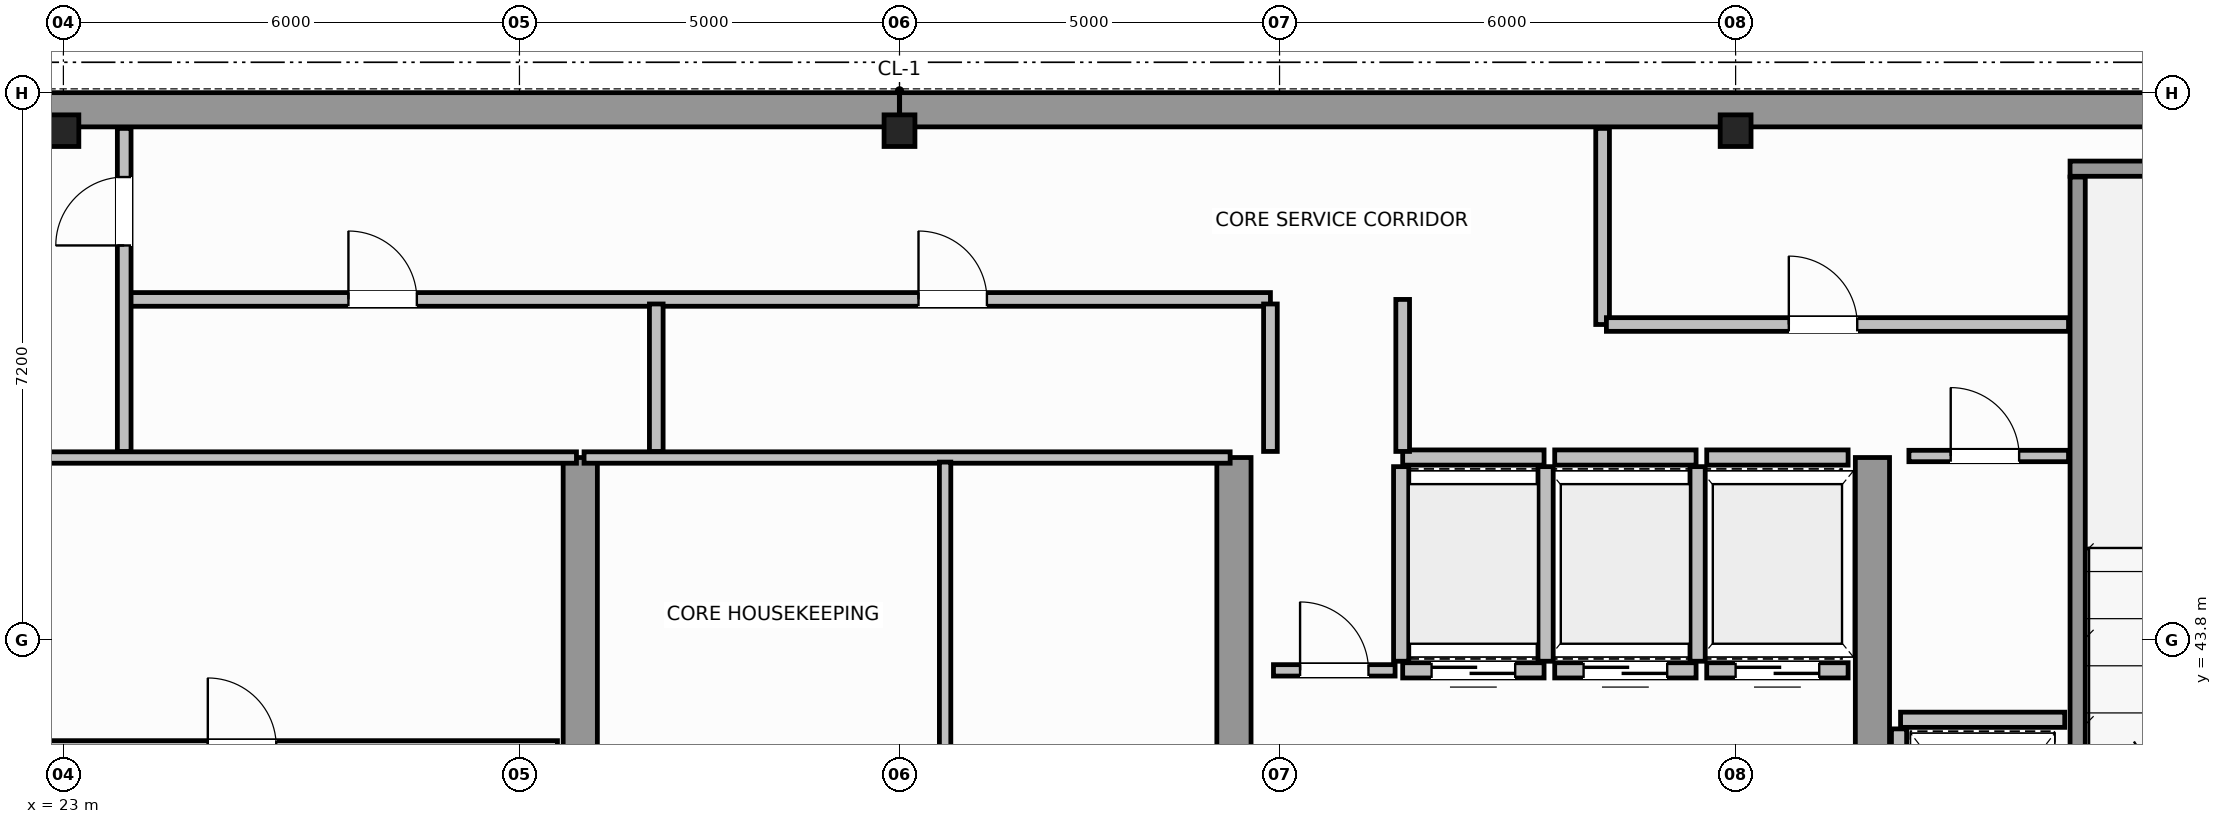
"""IFC4 building model, lengths in metres.
Left out: names, types, materials, properties, quantities, classifications, styles, units other than length and angle.
Written with IfcOpenShell. Run it as: python <this file> out.ifc"""

import sys

from ifc_helpers import new_model, si_unit, direction, frame, frame_2d, origin, origin_2d, place, context, subcontext, project, spatial, rectangle, i_section, extrude, source, transform, mapped, element, fill, save


model = new_model("IFC4")
c1 = context("Model", 3, precision=1e-05, world=origin(), true_north=direction((0.0, 1.0)))
c2 = subcontext(c1, "Body", "Model", "MODEL_VIEW")
j1 = project(units=[si_unit("LENGTHUNIT", "METRE"), si_unit("PLANEANGLEUNIT", "RADIAN")], contexts=[c1])
p1 = place(None, origin())
s1 = spatial("IfcSite", under=j1, at=p1, CompositionType="ELEMENT")
p2 = place(p1, origin())
s2 = spatial("IfcBuilding", under=s1, at=p2, CompositionType="ELEMENT")
p3 = place(p2, frame((0.0, 0.0, 291.6)))
s3 = spatial("IfcBuildingStorey", under=s2, at=p3, CompositionType="ELEMENT", Elevation=291.6)
m1 = source(origin(), c2, "Body", "SweptSolid", [
    extrude(i_section(OverallWidth=0.406, OverallDepth=0.416, WebThickness=0.03, FlangeThickness=0.042, FilletRadius=0.015, at=origin_2d()), origin(), (0.0, 0.0, 1.0), 3.8),
])
for number, where, z_axis, x_axis in (
    (1, (23.0, 50.5, 0.0), (0.0, 0.0, 1.0), (1.0, 0.0, 0.0)),
    (2, (34.0, 50.5, 0.0), (0.0, 0.0, 1.0), (1.0, 0.0, 0.0)),
    (3, (45.0, 50.5, 0.0), (0.0, 0.0, 1.0), (1.0, 0.0, 0.0)),
):
    element("IfcColumn", number, at=place(p3, frame(where, z_axis=z_axis, x_axis=x_axis)), inside=s3, PredefinedType="COLUMN", context=c2, shape_type="MappedRepresentation", body=[
        mapped(m1, transform((0.0, 0.0, 0.0), scale=1.0)),
    ])
for number, where, z_axis, x_axis in (
    (4, (14.229, 50.775, 0.0), (0.0, 0.0, 1.0), (1.0, 0.0, 0.0)),
    (5, (34.002, 50.775, 0.0), (0.0, 0.0, 1.0), (1.0, 0.0, 0.0)),
):
    element("IfcWall", number, at=place(p3, frame(where, z_axis=z_axis, x_axis=x_axis)), inside=s3, PredefinedType="SHEAR", context=c2, shape_type="SweptSolid", body=[
        extrude(rectangle(XDim=19.769, YDim=0.45, at=frame_2d((9.885, 0.0))), origin(), (0.0, 0.0, 1.0), 3.8),
    ])
for number, where, z_axis, x_axis in (
    (6, (29.8, 36.745, 0.0), (0.0, 0.0, 1.0), (0.0, 1.0, 0.0)),
    (7, (38.4, 36.745, 0.0), (0.0, 0.0, 1.0), (0.0, 1.0, 0.0)),
    (8, (46.8, 36.745, 0.0), (0.0, 0.0, 1.0), (0.0, 1.0, 0.0)),
):
    element("IfcWall", number, at=place(p3, frame(where, z_axis=z_axis, x_axis=x_axis)), inside=s3, PredefinedType="SHEAR", context=c2, shape_type="SweptSolid", body=[
        extrude(rectangle(XDim=9.455, YDim=0.45, at=frame_2d((4.728, 0.0))), origin(), (0.0, 0.0, 1.0), 3.8),
    ])
p4 = place(p3, frame((49.4, 50.0, 0.0), z_axis=(0.0, 0.0, 1.0), x_axis=(1.0, 0.0, 0.0)))
e9 = element("IfcWall", 9, at=p4, inside=s3, PredefinedType="SOLIDWALL", context=c2, shape_type="SweptSolid", body=[
    extrude(rectangle(XDim=4.375, YDim=0.2, at=frame_2d((2.188, 0.0))), origin(), (0.0, 0.0, 1.0), 3.8),
])
p5 = place(p3, frame((49.5, 39.96, 0.0), z_axis=(0.0, 0.0, 1.0), x_axis=(0.0, 1.0, 0.0)))
e10 = element("IfcWall", 10, at=p5, inside=s3, PredefinedType="SOLIDWALL", context=c2, shape_type="SweptSolid", body=[
    extrude(rectangle(XDim=9.93, YDim=0.2, at=frame_2d((4.965, 0.0))), origin(), (0.0, 0.0, 1.0), 3.8),
])
p6 = place(p3, frame((40.62, 43.4, 0.0), z_axis=(0.0, 0.0, 1.0), x_axis=(1.0, 0.0, 0.0)))
e11 = element("IfcWall", 11, at=p6, inside=s3, PredefinedType="SOLIDWALL", context=c2, shape_type="SweptSolid", body=[
    extrude(rectangle(XDim=1.86, YDim=0.2, at=frame_2d((0.93, 0.0))), origin(), (0.0, 0.0, 1.0), 3.58),
])
p7 = place(p6, frame((0.38, 0.0, 0.0)))
e12 = element("IfcOpeningElement", 12, at=p7, cuts=e11, PredefinedType="OPENING", context=c2, shape_type="SweptSolid", body=[
    extrude(rectangle(XDim=1.1, YDim=2.15, at=frame_2d((0.55, 1.075))), frame((0.0, 0.11, 0.0), z_axis=(0.0, -1.0, 0.0), x_axis=(1.0, 0.0, 0.0)), (0.0, 0.0, 1.0), 0.22),
])
p8 = place(p3, frame((40.62, 46.2, 0.0), z_axis=(0.0, 0.0, 1.0), x_axis=(1.0, 0.0, 0.0)))
e13 = element("IfcWall", 13, at=p8, inside=s3, PredefinedType="SOLIDWALL", context=c2, shape_type="SweptSolid", body=[
    extrude(rectangle(XDim=1.86, YDim=0.2, at=frame_2d((0.93, 0.0))), origin(), (0.0, 0.0, 1.0), 3.58),
])
for number, where, z_axis, x_axis in (
    (14, (40.6, 43.52, 0.0), (0.0, 0.0, 1.0), (0.0, 1.0, 0.0)),
    (15, (42.5, 43.52, 0.0), (0.0, 0.0, 1.0), (0.0, 1.0, 0.0)),
):
    element("IfcWall", number, at=place(p3, frame(where, z_axis=z_axis, x_axis=x_axis)), inside=s3, PredefinedType="SOLIDWALL", context=c2, shape_type="SweptSolid", body=[
        extrude(rectangle(XDim=2.56, YDim=0.2, at=frame_2d((1.28, 0.0))), origin(), (0.0, 0.0, 1.0), 3.58),
    ])
p9 = place(p3, frame((42.62, 43.4, 0.0), z_axis=(0.0, 0.0, 1.0), x_axis=(1.0, 0.0, 0.0)))
e16 = element("IfcWall", 16, at=p9, inside=s3, PredefinedType="SOLIDWALL", context=c2, shape_type="SweptSolid", body=[
    extrude(rectangle(XDim=1.86, YDim=0.2, at=frame_2d((0.93, 0.0))), origin(), (0.0, 0.0, 1.0), 3.58),
])
p10 = place(p9, frame((0.38, 0.0, 0.0)))
e17 = element("IfcOpeningElement", 17, at=p10, cuts=e16, PredefinedType="OPENING", context=c2, shape_type="SweptSolid", body=[
    extrude(rectangle(XDim=1.1, YDim=2.15, at=frame_2d((0.55, 1.075))), frame((0.0, 0.11, 0.0), z_axis=(0.0, -1.0, 0.0), x_axis=(1.0, 0.0, 0.0)), (0.0, 0.0, 1.0), 0.22),
])
p11 = place(p3, frame((42.62, 46.2, 0.0), z_axis=(0.0, 0.0, 1.0), x_axis=(1.0, 0.0, 0.0)))
e18 = element("IfcWall", 18, at=p11, inside=s3, PredefinedType="SOLIDWALL", context=c2, shape_type="SweptSolid", body=[
    extrude(rectangle(XDim=1.86, YDim=0.2, at=frame_2d((0.93, 0.0))), origin(), (0.0, 0.0, 1.0), 3.58),
])
p12 = place(p3, frame((44.5, 43.52, 0.0), z_axis=(0.0, 0.0, 1.0), x_axis=(0.0, 1.0, 0.0)))
e19 = element("IfcWall", 19, at=p12, inside=s3, PredefinedType="SOLIDWALL", context=c2, shape_type="SweptSolid", body=[
    extrude(rectangle(XDim=2.56, YDim=0.2, at=frame_2d((1.28, 0.0))), origin(), (0.0, 0.0, 1.0), 3.58),
])
p13 = place(p3, frame((44.62, 43.4, 0.0), z_axis=(0.0, 0.0, 1.0), x_axis=(1.0, 0.0, 0.0)))
e20 = element("IfcWall", 20, at=p13, inside=s3, PredefinedType="SOLIDWALL", context=c2, shape_type="SweptSolid", body=[
    extrude(rectangle(XDim=1.86, YDim=0.2, at=frame_2d((0.93, 0.0))), origin(), (0.0, 0.0, 1.0), 3.58),
])
p14 = place(p13, frame((0.38, 0.0, 0.0)))
e21 = element("IfcOpeningElement", 21, at=p14, cuts=e20, PredefinedType="OPENING", context=c2, shape_type="SweptSolid", body=[
    extrude(rectangle(XDim=1.1, YDim=2.15, at=frame_2d((0.55, 1.075))), frame((0.0, 0.11, 0.0), z_axis=(0.0, -1.0, 0.0), x_axis=(1.0, 0.0, 0.0)), (0.0, 0.0, 1.0), 0.22),
])
p15 = place(p3, frame((44.62, 46.2, 0.0), z_axis=(0.0, 0.0, 1.0), x_axis=(1.0, 0.0, 0.0)))
e22 = element("IfcWall", 22, at=p15, inside=s3, PredefinedType="SOLIDWALL", context=c2, shape_type="SweptSolid", body=[
    extrude(rectangle(XDim=1.86, YDim=0.2, at=frame_2d((0.93, 0.0))), origin(), (0.0, 0.0, 1.0), 3.58),
])
p16 = place(p3, frame((47.17, 42.75, 0.0), z_axis=(0.0, 0.0, 1.0), x_axis=(1.0, 0.0, 0.0)))
e23 = element("IfcWall", 23, at=p16, inside=s3, PredefinedType="SOLIDWALL", context=c2, shape_type="SweptSolid", body=[
    extrude(rectangle(XDim=2.16, YDim=0.2, at=frame_2d((1.08, 0.0))), origin(), (0.0, 0.0, 1.0), 3.58),
])
p17 = place(p3, frame((47.15, 40.07, 0.0), z_axis=(0.0, 0.0, 1.0), x_axis=(0.0, 1.0, 0.0)))
e24 = element("IfcWall", 24, at=p17, inside=s3, PredefinedType="SOLIDWALL", context=c2, shape_type="SweptSolid", body=[
    extrude(rectangle(XDim=2.56, YDim=0.2, at=frame_2d((1.28, 0.0))), origin(), (0.0, 0.0, 1.0), 3.58),
])
p18 = place(p3, frame((21.25, 46.2, 0.0), z_axis=(0.0, 0.0, 1.0), x_axis=(1.0, 0.0, 0.0)))
e25 = element("IfcWall", 25, at=p18, inside=s3, PredefinedType="PARTITIONING", context=c2, shape_type="SweptSolid", body=[
    extrude(rectangle(XDim=8.5, YDim=0.15, at=frame_2d((4.25, 0.0))), origin(), (0.0, 0.0, 1.0), 3.58),
])
p19 = place(p3, frame((21.5, 42.4, 0.0), z_axis=(0.0, 0.0, 1.0), x_axis=(1.0, 0.0, 0.0)))
e26 = element("IfcWall", 26, at=p19, inside=s3, PredefinedType="PARTITIONING", context=c2, shape_type="SweptSolid", body=[
    extrude(rectangle(XDim=8.0, YDim=0.15, at=frame_2d((4.0, 0.0))), origin(), (0.0, 0.0, 1.0), 3.58),
])
p20 = place(p19, frame((3.4, 0.0, 0.0)))
e27 = element("IfcOpeningElement", 27, at=p20, cuts=e26, PredefinedType="OPENING", context=c2, shape_type="SweptSolid", body=[
    extrude(rectangle(XDim=0.9, YDim=2.1, at=frame_2d((0.45, 1.05))), frame((0.0, 0.085, 0.0), z_axis=(0.0, -1.0, 0.0), x_axis=(1.0, 0.0, 0.0)), (0.0, 0.0, 1.0), 0.17),
])
p21 = place(p3, frame((29.85, 46.2, 0.0), z_axis=(0.0, 0.0, 1.0), x_axis=(1.0, 0.0, 0.0)))
e28 = element("IfcWall", 28, at=p21, inside=s3, PredefinedType="PARTITIONING", context=c2, shape_type="SweptSolid", body=[
    extrude(rectangle(XDim=8.5, YDim=0.15, at=frame_2d((4.25, 0.0))), origin(), (0.0, 0.0, 1.0), 3.58),
])
p22 = place(p3, frame((34.6, 36.56, 0.0), z_axis=(0.0, 0.0, 1.0), x_axis=(0.0, 1.0, 0.0)))
e29 = element("IfcWall", 29, at=p22, inside=s3, PredefinedType="PARTITIONING", context=c2, shape_type="SweptSolid", body=[
    extrude(rectangle(XDim=9.58, YDim=0.15, at=frame_2d((4.79, 0.0))), origin(), (0.0, 0.0, 1.0), 3.58),
])
p23 = place(p22, frame((4.2, 0.0, 0.0)))
e30 = element("IfcOpeningElement", 30, at=p23, cuts=e29, PredefinedType="OPENING", context=c2, shape_type="SweptSolid", body=[
    extrude(rectangle(XDim=0.9, YDim=2.1, at=frame_2d((0.45, 1.05))), frame((0.0, 0.085, 0.0), z_axis=(0.0, -1.0, 0.0), x_axis=(1.0, 0.0, 0.0)), (0.0, 0.0, 1.0), 0.17),
])
p24 = place(p3, frame((47.28, 46.22, 0.0), z_axis=(0.0, 0.0, 1.0), x_axis=(1.0, 0.0, 0.0)))
e31 = element("IfcWall", 31, at=p24, inside=s3, PredefinedType="PARTITIONING", context=c2, shape_type="SweptSolid", body=[
    extrude(rectangle(XDim=2.1, YDim=0.15, at=frame_2d((1.05, 0.0))), origin(), (0.0, 0.0, 1.0), 3.58),
])
p25 = place(p24, frame((0.55, 0.0, 0.0)))
e32 = element("IfcOpeningElement", 32, at=p25, cuts=e31, PredefinedType="OPENING", context=c2, shape_type="SweptSolid", body=[
    extrude(rectangle(XDim=0.9, YDim=2.1, at=frame_2d((0.45, 1.05))), frame((0.0, 0.085, 0.0), z_axis=(0.0, -1.0, 0.0), x_axis=(1.0, 0.0, 0.0)), (0.0, 0.0, 1.0), 0.17),
])
p26 = place(p3, frame((38.92, 43.4, 0.0), z_axis=(0.0, 0.0, 1.0), x_axis=(1.0, 0.0, 0.0)))
e33 = element("IfcWall", 33, at=p26, inside=s3, PredefinedType="PARTITIONING", context=c2, shape_type="SweptSolid", body=[
    extrude(rectangle(XDim=1.6, YDim=0.15, at=frame_2d((0.8, 0.0))), origin(), (0.0, 0.0, 1.0), 3.58),
])
p27 = place(p26, frame((0.35, 0.0, 0.0)))
e34 = element("IfcOpeningElement", 34, at=p27, cuts=e33, PredefinedType="OPENING", context=c2, shape_type="SweptSolid", body=[
    extrude(rectangle(XDim=0.9, YDim=2.1, at=frame_2d((0.45, 1.05))), frame((0.0, 0.085, 0.0), z_axis=(0.0, -1.0, 0.0), x_axis=(1.0, 0.0, 0.0)), (0.0, 0.0, 1.0), 0.17),
])
p28 = place(p3, frame((23.85, 48.28, 0.0), z_axis=(0.0, 0.0, 1.0), x_axis=(1.0, 0.0, 0.0)))
e35 = element("IfcWall", 35, at=p28, inside=s3, PredefinedType="PLUMBINGWALL", context=c2, shape_type="SweptSolid", body=[
    extrude(rectangle(XDim=15.03, YDim=0.18, at=frame_2d((7.515, 0.0))), origin(), (0.0, 0.0, 1.0), 3.58),
])
p29 = place(p28, frame((2.9, 0.0, 0.0)))
e36 = element("IfcOpeningElement", 36, at=p29, cuts=e35, PredefinedType="OPENING", context=c2, shape_type="SweptSolid", body=[
    extrude(rectangle(XDim=0.9, YDim=2.15, at=frame_2d((0.45, 1.075))), frame((0.0, 0.1, 0.0), z_axis=(0.0, -1.0, 0.0), x_axis=(1.0, 0.0, 0.0)), (0.0, 0.0, 1.0), 0.2),
])
p30 = place(p28, frame((10.4, 0.0, 0.0)))
e37 = element("IfcOpeningElement", 37, at=p30, cuts=e35, PredefinedType="OPENING", context=c2, shape_type="SweptSolid", body=[
    extrude(rectangle(XDim=0.9, YDim=2.15, at=frame_2d((0.45, 1.075))), frame((0.0, 0.1, 0.0), z_axis=(0.0, -1.0, 0.0), x_axis=(1.0, 0.0, 0.0)), (0.0, 0.0, 1.0), 0.2),
])
p31 = place(p3, frame((23.8, 46.28, 0.0), z_axis=(0.0, 0.0, 1.0), x_axis=(0.0, 1.0, 0.0)))
e38 = element("IfcWall", 38, at=p31, inside=s3, PredefinedType="PLUMBINGWALL", context=c2, shape_type="SweptSolid", body=[
    extrude(rectangle(XDim=4.25, YDim=0.18, at=frame_2d((2.125, 0.0))), origin(), (0.0, 0.0, 1.0), 3.58),
])
p32 = place(p31, frame((2.71, 0.0, 0.0)))
e39 = element("IfcOpeningElement", 39, at=p32, cuts=e38, PredefinedType="OPENING", context=c2, shape_type="SweptSolid", body=[
    extrude(rectangle(XDim=0.9, YDim=2.15, at=frame_2d((0.45, 1.075))), frame((0.0, 0.1, 0.0), z_axis=(0.0, -1.0, 0.0), x_axis=(1.0, 0.0, 0.0)), (0.0, 0.0, 1.0), 0.2),
])
for number, where, z_axis, x_axis in (
    (40, (30.8, 46.28, 0.0), (0.0, 0.0, 1.0), (0.0, 1.0, 0.0)),
    (41, (38.88, 46.28, 0.0), (0.0, 0.0, 1.0), (0.0, 1.0, 0.0)),
):
    element("IfcWall", number, at=place(p3, frame(where, z_axis=z_axis, x_axis=x_axis)), inside=s3, PredefinedType="PLUMBINGWALL", context=c2, shape_type="SweptSolid", body=[
        extrude(rectangle(XDim=1.94, YDim=0.18, at=frame_2d((0.97, 0.0))), origin(), (0.0, 0.0, 1.0), 3.58),
    ])
p33 = place(p3, frame((40.62, 46.28, 0.0), z_axis=(0.0, 0.0, 1.0), x_axis=(0.0, 1.0, 0.0)))
e42 = element("IfcWall", 42, at=p33, inside=s3, PredefinedType="PLUMBINGWALL", context=c2, shape_type="SweptSolid", body=[
    extrude(rectangle(XDim=2.0, YDim=0.18, at=frame_2d((1.0, 0.0))), origin(), (0.0, 0.0, 1.0), 3.58),
])
p34 = place(p3, frame((43.25, 47.95, 0.0), z_axis=(0.0, 0.0, 1.0), x_axis=(0.0, 1.0, 0.0)))
e43 = element("IfcWall", 43, at=p34, inside=s3, PredefinedType="PLUMBINGWALL", context=c2, shape_type="SweptSolid", body=[
    extrude(rectangle(XDim=2.58, YDim=0.18, at=frame_2d((1.29, 0.0))), origin(), (0.0, 0.0, 1.0), 3.58),
])
p35 = place(p3, frame((43.3, 47.95, 0.0), z_axis=(0.0, 0.0, 1.0), x_axis=(1.0, 0.0, 0.0)))
e44 = element("IfcWall", 44, at=p35, inside=s3, PredefinedType="PLUMBINGWALL", context=c2, shape_type="SweptSolid", body=[
    extrude(rectangle(XDim=6.08, YDim=0.18, at=frame_2d((3.04, 0.0))), origin(), (0.0, 0.0, 1.0), 3.58),
])
p36 = place(p35, frame((2.4, 0.0, 0.0)))
e45 = element("IfcOpeningElement", 45, at=p36, cuts=e44, PredefinedType="OPENING", context=c2, shape_type="SweptSolid", body=[
    extrude(rectangle(XDim=0.9, YDim=2.15, at=frame_2d((0.45, 1.075))), frame((0.0, 0.1, 0.0), z_axis=(0.0, -1.0, 0.0), x_axis=(1.0, 0.0, 0.0)), (0.0, 0.0, 1.0), 0.2),
])
m2 = source(origin(), c2, "Body", "SweptSolid", [
    extrude(rectangle(XDim=1.1, YDim=2.15, at=frame_2d((0.55, 1.075))), frame((0.0, 0.025, 0.0), z_axis=(0.0, -1.0, 0.0), x_axis=(1.0, 0.0, 0.0)), (0.0, 0.0, 1.0), 0.05),
])
p37 = place(p7, origin())
e46 = element("IfcDoor", 46, at=p37, inside=s3, OperationType="DOUBLE_DOOR_SLIDING", PredefinedType="DOOR", context=c2, shape_type="MappedRepresentation", body=[
    mapped(m2, transform((0.0, 0.0, 0.0), scale=1.0)),
])
fill(e12, e46)
p38 = place(p10, origin())
e47 = element("IfcDoor", 47, at=p38, inside=s3, OperationType="DOUBLE_DOOR_SLIDING", PredefinedType="DOOR", context=c2, shape_type="MappedRepresentation", body=[
    mapped(m2, transform((0.0, 0.0, 0.0), scale=1.0)),
])
fill(e17, e47)
p39 = place(p14, origin())
e48 = element("IfcDoor", 48, at=p39, inside=s3, OperationType="DOUBLE_DOOR_SLIDING", PredefinedType="DOOR", context=c2, shape_type="MappedRepresentation", body=[
    mapped(m2, transform((0.0, 0.0, 0.0), scale=1.0)),
])
fill(e21, e48)
m3 = source(origin(), c2, "Body", "SweptSolid", [
    extrude(rectangle(XDim=0.9, YDim=2.1, at=frame_2d((0.45, 1.05))), frame((0.0, 0.025, 0.0), z_axis=(0.0, -1.0, 0.0), x_axis=(1.0, 0.0, 0.0)), (0.0, 0.0, 1.0), 0.05),
])
p40 = place(p20, origin())
e49 = element("IfcDoor", 49, at=p40, inside=s3, OperationType="SINGLE_SWING_RIGHT", PredefinedType="DOOR", context=c2, shape_type="MappedRepresentation", body=[
    mapped(m3, transform((0.0, 0.0, 0.0), scale=1.0)),
])
fill(e27, e49)
p41 = place(p25, origin())
e50 = element("IfcDoor", 50, at=p41, inside=s3, OperationType="SINGLE_SWING_RIGHT", PredefinedType="DOOR", context=c2, shape_type="MappedRepresentation", body=[
    mapped(m3, transform((0.0, 0.0, 0.0), scale=1.0)),
])
fill(e32, e50)
p42 = place(p27, origin())
e51 = element("IfcDoor", 51, at=p42, inside=s3, OperationType="SINGLE_SWING_LEFT", PredefinedType="DOOR", context=c2, shape_type="MappedRepresentation", body=[
    mapped(m3, transform((0.0, 0.0, 0.0), scale=1.0)),
])
fill(e34, e51)
m4 = source(origin(), c2, "Body", "SweptSolid", [
    extrude(rectangle(XDim=0.9, YDim=2.15, at=frame_2d((0.45, 1.075))), frame((0.0, 0.025, 0.0), z_axis=(0.0, -1.0, 0.0), x_axis=(1.0, 0.0, 0.0)), (0.0, 0.0, 1.0), 0.05),
])
p43 = place(p32, origin())
e52 = element("IfcDoor", 52, at=p43, inside=s3, OperationType="SINGLE_SWING_LEFT", PredefinedType="DOOR", context=c2, shape_type="MappedRepresentation", body=[
    mapped(m4, transform((0.0, 0.0, 0.0), scale=1.0)),
])
fill(e39, e52)
p44 = place(p29, origin())
e53 = element("IfcDoor", 53, at=p44, inside=s3, OperationType="SINGLE_SWING_RIGHT", PredefinedType="DOOR", context=c2, shape_type="MappedRepresentation", body=[
    mapped(m4, transform((0.0, 0.0, 0.0), scale=1.0)),
])
fill(e36, e53)
p45 = place(p30, origin())
e54 = element("IfcDoor", 54, at=p45, inside=s3, OperationType="SINGLE_SWING_LEFT", PredefinedType="DOOR", context=c2, shape_type="MappedRepresentation", body=[
    mapped(m4, transform((0.0, 0.0, 0.0), scale=1.0)),
])
fill(e37, e54)
p46 = place(p36, origin())
e55 = element("IfcDoor", 55, at=p46, inside=s3, OperationType="SINGLE_SWING_RIGHT", PredefinedType="DOOR", context=c2, shape_type="MappedRepresentation", body=[
    mapped(m4, transform((0.0, 0.0, 0.0), scale=1.0)),
])
fill(e45, e55)
save(model, sys.argv[1])
